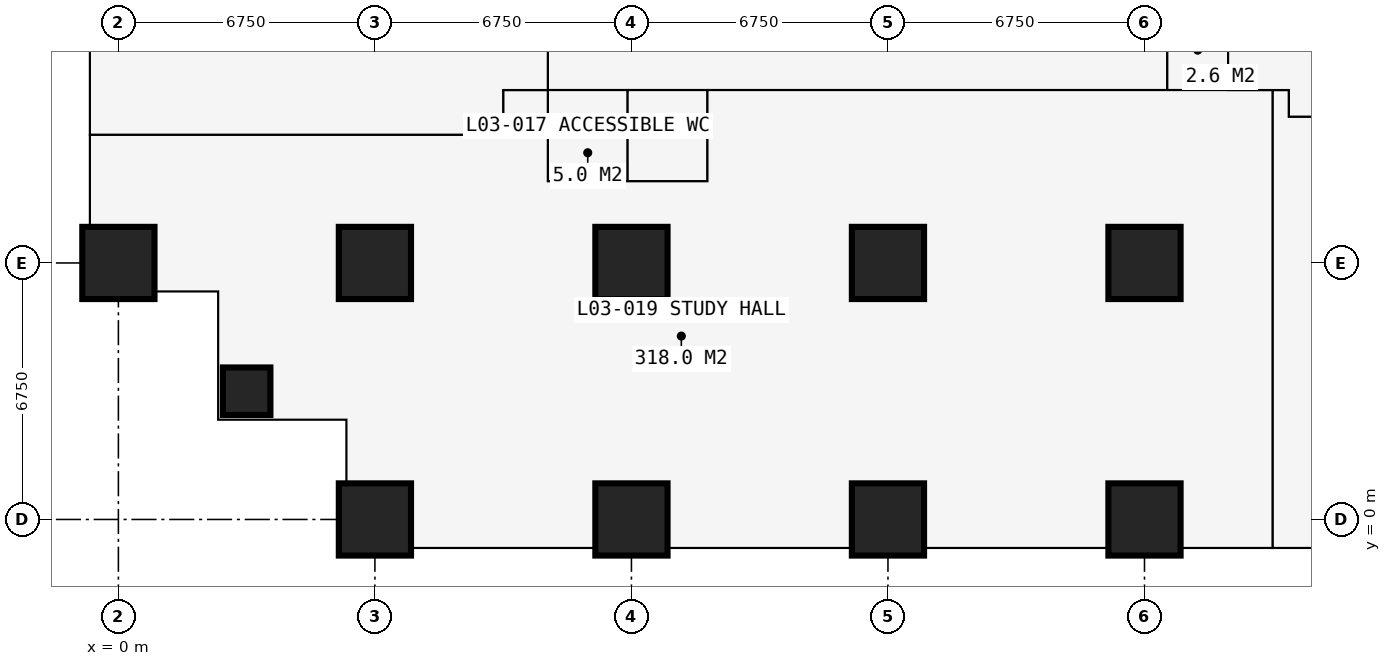
"""IFC4 building model, lengths in metres.
Left out: names, types, materials, properties, quantities, classifications, styles, units other than length and angle.
Written with IfcOpenShell. Run it as: python <this file> out.ifc"""

import sys

from ifc_helpers import new_model, si_unit, direction, frame, frame_2d, origin, origin_2d, place, context, subcontext, project, spatial, rectangle, extrude, element, fill, save


model = new_model("IFC4")
c1 = context("Model", 3, precision=1e-05, world=origin(), true_north=direction((0.0, 1.0)))
c2 = subcontext(c1, "Body", "Model", "MODEL_VIEW")
j1 = project(units=[si_unit("LENGTHUNIT", "METRE"), si_unit("PLANEANGLEUNIT", "RADIAN")], contexts=[c1])
p1 = place(None, origin())
s1 = spatial("IfcSite", under=j1, at=p1, CompositionType="ELEMENT")
p2 = place(p1, origin())
s2 = spatial("IfcBuilding", under=s1, at=p2, CompositionType="ELEMENT")
p3 = place(p2, frame((0.0, 0.0, 13.5)))
s3 = spatial("IfcBuildingStorey", under=s2, at=p3, CompositionType="ELEMENT", Elevation=13.5)
p4 = place(p3, frame((0.0, 6.75, 0.0), z_axis=(0.0, 0.0, 1.0), x_axis=(1.0, 0.0, 0.0)))
e1 = element("IfcColumn", 1, at=p4, inside=s3, PredefinedType="COLUMN", context=c2, shape_type="SweptSolid", body=[
    extrude(rectangle(XDim=1.9, YDim=1.9, at=origin_2d()), origin(), (0.0, 0.0, 1.0), 4.5),
])
p5 = place(p3, frame((3.375, 3.375, 0.0), z_axis=(0.0, 0.0, 1.0), x_axis=(1.0, 0.0, 0.0)))
e2 = element("IfcColumn", 2, at=p5, inside=s3, PredefinedType="COLUMN", context=c2, shape_type="SweptSolid", body=[
    extrude(rectangle(XDim=1.25, YDim=1.25, at=origin_2d()), origin(), (0.0, 0.0, 1.0), 4.5),
])
for number, where, z_axis, x_axis in (
    (3, (6.75, 0.0, 0.0), (0.0, 0.0, 1.0), (1.0, 0.0, 0.0)),
    (4, (6.75, 6.75, 0.0), (0.0, 0.0, 1.0), (1.0, 0.0, 0.0)),
    (5, (13.5, 0.0, 0.0), (0.0, 0.0, 1.0), (1.0, 0.0, 0.0)),
    (6, (13.5, 6.75, 0.0), (0.0, 0.0, 1.0), (1.0, 0.0, 0.0)),
    (7, (20.25, 0.0, 0.0), (0.0, 0.0, 1.0), (1.0, 0.0, 0.0)),
    (8, (20.25, 6.75, 0.0), (0.0, 0.0, 1.0), (1.0, 0.0, 0.0)),
    (9, (27.0, 0.0, 0.0), (0.0, 0.0, 1.0), (1.0, 0.0, 0.0)),
    (10, (27.0, 6.75, 0.0), (0.0, 0.0, 1.0), (1.0, 0.0, 0.0)),
):
    element("IfcColumn", number, at=place(p3, frame(where, z_axis=z_axis, x_axis=x_axis)), inside=s3, PredefinedType="COLUMN", context=c2, shape_type="SweptSolid", body=[
        extrude(rectangle(XDim=1.9, YDim=1.9, at=origin_2d()), origin(), (0.0, 0.0, 1.0), 4.5),
    ])
p6 = place(p3, frame((-0.75, 6.0, 0.0), z_axis=(0.0, 0.0, 1.0), x_axis=(1.0, 0.0, 0.0)))
e11 = element("IfcWall", 11, at=p6, inside=s3, PredefinedType="SOLIDWALL", context=c2, shape_type="SweptSolid", body=[
    extrude(rectangle(XDim=3.375, YDim=0.3, at=frame_2d((1.688, 0.0))), origin(), (0.0, 0.0, 1.0), 4.275),
])
p7 = place(p6, frame((1.857, 0.0, 0.9)))
e12 = element("IfcOpeningElement", 12, at=p7, cuts=e11, PredefinedType="OPENING", context=c2, shape_type="SweptSolid", body=[
    extrude(rectangle(XDim=1.2, YDim=1.8, at=frame_2d((0.6, 0.9))), frame((0.0, 0.16, 0.0), z_axis=(0.0, -1.0, 0.0), x_axis=(1.0, 0.0, 0.0)), (0.0, 0.0, 1.0), 0.32),
])
p8 = place(p3, frame((2.625, 6.0, 0.0), z_axis=(0.0, 0.0, 1.0), x_axis=(0.0, -1.0, 0.0)))
e13 = element("IfcWall", 13, at=p8, inside=s3, PredefinedType="SOLIDWALL", context=c2, shape_type="SweptSolid", body=[
    extrude(rectangle(XDim=3.375, YDim=0.3, at=frame_2d((1.688, 0.0))), origin(), (0.0, 0.0, 1.0), 4.275),
])
p9 = place(p8, frame((0.938, 0.0, 0.9)))
e14 = element("IfcOpeningElement", 14, at=p9, cuts=e13, PredefinedType="OPENING", context=c2, shape_type="SweptSolid", body=[
    extrude(rectangle(XDim=1.5, YDim=1.8, at=frame_2d((0.75, 0.9))), frame((0.0, 0.16, 0.0), z_axis=(0.0, -1.0, 0.0), x_axis=(1.0, 0.0, 0.0)), (0.0, 0.0, 1.0), 0.32),
])
p10 = place(p3, frame((2.625, 2.625, 0.0), z_axis=(0.0, 0.0, 1.0), x_axis=(1.0, 0.0, 0.0)))
e15 = element("IfcWall", 15, at=p10, inside=s3, PredefinedType="SOLIDWALL", context=c2, shape_type="SweptSolid", body=[
    extrude(rectangle(XDim=3.375, YDim=0.3, at=frame_2d((1.688, 0.0))), origin(), (0.0, 0.0, 1.0), 4.275),
])
p11 = place(p10, frame((0.938, 0.0, 0.9)))
e16 = element("IfcOpeningElement", 16, at=p11, cuts=e15, PredefinedType="OPENING", context=c2, shape_type="SweptSolid", body=[
    extrude(rectangle(XDim=1.5, YDim=1.8, at=frame_2d((0.75, 0.9))), frame((0.0, 0.16, 0.0), z_axis=(0.0, -1.0, 0.0), x_axis=(1.0, 0.0, 0.0)), (0.0, 0.0, 1.0), 0.32),
])
p12 = place(p3, frame((6.0, 2.625, 0.0), z_axis=(0.0, 0.0, 1.0), x_axis=(0.0, -1.0, 0.0)))
e17 = element("IfcWall", 17, at=p12, inside=s3, PredefinedType="SOLIDWALL", context=c2, shape_type="SweptSolid", body=[
    extrude(rectangle(XDim=3.375, YDim=0.3, at=frame_2d((1.688, 0.0))), origin(), (0.0, 0.0, 1.0), 4.275),
])
p13 = place(p12, frame((0.317, 0.0, 0.9)))
e18 = element("IfcOpeningElement", 18, at=p13, cuts=e17, PredefinedType="OPENING", context=c2, shape_type="SweptSolid", body=[
    extrude(rectangle(XDim=1.2, YDim=1.8, at=frame_2d((0.6, 0.9))), frame((0.0, 0.16, 0.0), z_axis=(0.0, -1.0, 0.0), x_axis=(1.0, 0.0, 0.0)), (0.0, 0.0, 1.0), 0.32),
])
p14 = place(p3, frame((27.0, -0.75, 0.0), z_axis=(0.0, 0.0, 1.0), x_axis=(-1.0, 0.0, 0.0)))
e19 = element("IfcWall", 19, at=p14, inside=s3, PredefinedType="SOLIDWALL", context=c2, shape_type="SweptSolid", body=[
    extrude(rectangle(XDim=6.75, YDim=0.15, at=frame_2d((3.375, 0.0))), origin(), (0.0, 0.0, 1.0), 4.275),
])
p15 = place(p14, frame((0.962, 0.0, 0.0)))
e20 = element("IfcOpeningElement", 20, at=p15, cuts=e19, PredefinedType="OPENING", context=c2, shape_type="SweptSolid", body=[
    extrude(rectangle(XDim=2.4, YDim=2.4, at=frame_2d((1.2, 1.2))), frame((0.0, 0.085, 0.0), z_axis=(0.0, -1.0, 0.0), x_axis=(1.0, 0.0, 0.0)), (0.0, 0.0, 1.0), 0.17),
])
p16 = place(p14, frame((3.387, 0.0, 0.0)))
e21 = element("IfcOpeningElement", 21, at=p16, cuts=e19, PredefinedType="OPENING", context=c2, shape_type="SweptSolid", body=[
    extrude(rectangle(XDim=2.4, YDim=2.4, at=frame_2d((1.2, 1.2))), frame((0.0, 0.085, 0.0), z_axis=(0.0, -1.0, 0.0), x_axis=(1.0, 0.0, 0.0)), (0.0, 0.0, 1.0), 0.17),
])
p17 = place(p3, frame((-0.734, 10.125, 0.0), z_axis=(0.0, 0.0, 1.0), x_axis=(1.0, 0.0, 0.0)))
e22 = element("IfcWall", 22, at=p17, inside=s3, PredefinedType="PARTITIONING", context=c2, shape_type="SweptSolid", body=[
    extrude(rectangle(XDim=10.859, YDim=0.15, at=frame_2d((5.429, 0.0))), origin(), (0.0, 0.0, 1.0), 4.275),
])
p18 = place(p3, frame((10.125, 10.125, 0.0), z_axis=(0.0, 0.0, 1.0), x_axis=(0.0, 1.0, 0.0)))
e23 = element("IfcWall", 23, at=p18, inside=s3, PredefinedType="PARTITIONING", context=c2, shape_type="SweptSolid", body=[
    extrude(rectangle(XDim=1.175, YDim=0.15, at=frame_2d((0.587, 0.0))), origin(), (0.0, 0.0, 1.0), 4.275),
])
p19 = place(p3, frame((10.125, 11.3, 0.0), z_axis=(0.0, 0.0, 1.0), x_axis=(1.0, 0.0, 0.0)))
e24 = element("IfcWall", 24, at=p19, inside=s3, PredefinedType="PARTITIONING", context=c2, shape_type="SweptSolid", body=[
    extrude(rectangle(XDim=20.675, YDim=0.15, at=frame_2d((10.337, 0.0))), origin(), (0.0, 0.0, 1.0), 4.275),
])
p20 = place(p19, frame((1.725, 0.0, 0.0)))
e25 = element("IfcOpeningElement", 25, at=p20, cuts=e24, PredefinedType="OPENING", context=c2, shape_type="SweptSolid", body=[
    extrude(rectangle(XDim=1.0, YDim=2.2, at=frame_2d((0.5, 1.1))), frame((0.0, 0.085, 0.0), z_axis=(0.0, -1.0, 0.0), x_axis=(1.0, 0.0, 0.0)), (0.0, 0.0, 1.0), 0.17),
])
p21 = place(p19, frame((3.825, 0.0, 0.0)))
e26 = element("IfcOpeningElement", 26, at=p21, cuts=e24, PredefinedType="OPENING", context=c2, shape_type="SweptSolid", body=[
    extrude(rectangle(XDim=1.0, YDim=2.2, at=frame_2d((0.5, 1.1))), frame((0.0, 0.085, 0.0), z_axis=(0.0, -1.0, 0.0), x_axis=(1.0, 0.0, 0.0)), (0.0, 0.0, 1.0), 0.17),
])
p22 = place(p19, frame((10.625, 0.0, 0.0)))
e27 = element("IfcOpeningElement", 27, at=p22, cuts=e24, PredefinedType="OPENING", context=c2, shape_type="SweptSolid", body=[
    extrude(rectangle(XDim=1.6, YDim=2.4, at=frame_2d((0.8, 1.2))), frame((0.0, 0.085, 0.0), z_axis=(0.0, -1.0, 0.0), x_axis=(1.0, 0.0, 0.0)), (0.0, 0.0, 1.0), 0.17),
])
p23 = place(p3, frame((11.3, 8.9, 0.0), z_axis=(0.0, 0.0, 1.0), x_axis=(0.0, 1.0, 0.0)))
e28 = element("IfcWall", 28, at=p23, inside=s3, PredefinedType="PARTITIONING", context=c2, shape_type="SweptSolid", body=[
    extrude(rectangle(XDim=21.475, YDim=0.15, at=frame_2d((10.738, 0.0))), origin(), (0.0, 0.0, 1.0), 4.275),
])
p24 = place(p23, frame((16.65, 0.0, 0.0)))
e29 = element("IfcOpeningElement", 29, at=p24, cuts=e28, PredefinedType="OPENING", context=c2, shape_type="SweptSolid", body=[
    extrude(rectangle(XDim=1.0, YDim=2.2, at=frame_2d((0.5, 1.1))), frame((0.0, 0.085, 0.0), z_axis=(0.0, -1.0, 0.0), x_axis=(1.0, 0.0, 0.0)), (0.0, 0.0, 1.0), 0.17),
])
p25 = place(p23, frame((18.75, 0.0, 0.0)))
e30 = element("IfcOpeningElement", 30, at=p25, cuts=e28, PredefinedType="OPENING", context=c2, shape_type="SweptSolid", body=[
    extrude(rectangle(XDim=1.0, YDim=2.2, at=frame_2d((0.5, 1.1))), frame((0.0, 0.085, 0.0), z_axis=(0.0, -1.0, 0.0), x_axis=(1.0, 0.0, 0.0)), (0.0, 0.0, 1.0), 0.17),
])
p26 = place(p23, frame((8.45, 0.0, 0.0)))
e31 = element("IfcOpeningElement", 31, at=p26, cuts=e28, PredefinedType="OPENING", context=c2, shape_type="SweptSolid", body=[
    extrude(rectangle(XDim=1.6, YDim=2.4, at=frame_2d((0.8, 1.2))), frame((0.0, 0.085, 0.0), z_axis=(0.0, -1.0, 0.0), x_axis=(1.0, 0.0, 0.0)), (0.0, 0.0, 1.0), 0.17),
])
p27 = place(p3, frame((11.3, 8.9, 0.0), z_axis=(0.0, 0.0, 1.0), x_axis=(1.0, 0.0, 0.0)))
e32 = element("IfcWall", 32, at=p27, inside=s3, PredefinedType="PARTITIONING", context=c2, shape_type="SweptSolid", body=[
    extrude(rectangle(XDim=4.2, YDim=0.15, at=frame_2d((2.1, 0.0))), origin(), (0.0, 0.0, 1.0), 4.275),
])
p28 = place(p3, frame((13.4, 8.9, 0.0), z_axis=(0.0, 0.0, 1.0), x_axis=(0.0, 1.0, 0.0)))
e33 = element("IfcWall", 33, at=p28, inside=s3, PredefinedType="PARTITIONING", context=c2, shape_type="SweptSolid", body=[
    extrude(rectangle(XDim=2.4, YDim=0.1, at=frame_2d((1.2, 0.0))), origin(), (0.0, 0.0, 1.0), 3.777),
])
p29 = place(p3, frame((15.5, 8.9, 0.0), z_axis=(0.0, 0.0, 1.0), x_axis=(0.0, 1.0, 0.0)))
e34 = element("IfcWall", 34, at=p29, inside=s3, PredefinedType="PARTITIONING", context=c2, shape_type="SweptSolid", body=[
    extrude(rectangle(XDim=2.4, YDim=0.1, at=frame_2d((1.2, 0.0))), origin(), (0.0, 0.0, 1.0), 4.275),
])
p30 = place(p3, frame((27.6, 11.3, 0.0), z_axis=(0.0, 0.0, 1.0), x_axis=(0.0, 1.0, 0.0)))
e35 = element("IfcWall", 35, at=p30, inside=s3, PredefinedType="PARTITIONING", context=c2, shape_type="SweptSolid", body=[
    extrude(rectangle(XDim=1.6, YDim=0.15, at=frame_2d((0.8, 0.0))), origin(), (0.0, 0.0, 1.0), 4.275),
])
p31 = place(p30, frame((0.3, 0.0, 0.0)))
e36 = element("IfcOpeningElement", 36, at=p31, cuts=e35, PredefinedType="OPENING", context=c2, shape_type="SweptSolid", body=[
    extrude(rectangle(XDim=0.95, YDim=2.2, at=frame_2d((0.475, 1.1))), frame((0.0, 0.085, 0.0), z_axis=(0.0, -1.0, 0.0), x_axis=(1.0, 0.0, 0.0)), (0.0, 0.0, 1.0), 0.17),
])
p32 = place(p3, frame((29.2, 11.3, 0.0), z_axis=(0.0, 0.0, 1.0), x_axis=(0.0, 1.0, 0.0)))
e37 = element("IfcWall", 37, at=p32, inside=s3, PredefinedType="PARTITIONING", context=c2, shape_type="SweptSolid", body=[
    extrude(rectangle(XDim=20.3, YDim=0.15, at=frame_2d((10.15, 0.0))), origin(), (0.0, 0.0, 1.0), 4.275),
])
p33 = place(p32, frame((15.35, 0.0, 0.0)))
e38 = element("IfcOpeningElement", 38, at=p33, cuts=e37, PredefinedType="OPENING", context=c2, shape_type="SweptSolid", body=[
    extrude(rectangle(XDim=1.6, YDim=2.4, at=frame_2d((0.8, 1.2))), frame((0.0, 0.085, 0.0), z_axis=(0.0, -1.0, 0.0), x_axis=(1.0, 0.0, 0.0)), (0.0, 0.0, 1.0), 0.17),
])
p34 = place(p32, frame((8.35, 0.0, 0.0)))
e39 = element("IfcOpeningElement", 39, at=p34, cuts=e37, PredefinedType="OPENING", context=c2, shape_type="SweptSolid", body=[
    extrude(rectangle(XDim=1.2, YDim=2.2, at=frame_2d((0.6, 1.1))), frame((0.0, 0.085, 0.0), z_axis=(0.0, -1.0, 0.0), x_axis=(1.0, 0.0, 0.0)), (0.0, 0.0, 1.0), 0.17),
])
p35 = place(p3, frame((30.375, -0.734, 0.0), z_axis=(0.0, 0.0, 1.0), x_axis=(0.0, 1.0, 0.0)))
e40 = element("IfcWall", 40, at=p35, inside=s3, PredefinedType="PARTITIONING", context=c2, shape_type="SweptSolid", body=[
    extrude(rectangle(XDim=12.034, YDim=0.15, at=frame_2d((6.017, 0.0))), origin(), (0.0, 0.0, 1.0), 4.275),
])
p36 = place(p3, frame((30.8, 10.6, 0.0), z_axis=(0.0, 0.0, 1.0), x_axis=(0.0, 1.0, 0.0)))
e41 = element("IfcWall", 41, at=p36, inside=s3, PredefinedType="PARTITIONING", context=c2, shape_type="SweptSolid", body=[
    extrude(rectangle(XDim=0.7, YDim=0.15, at=frame_2d((0.35, 0.0))), origin(), (0.0, 0.0, 1.0), 4.275),
])
p37 = place(p3, frame((30.8, 10.6, 0.0), z_axis=(0.0, 0.0, 1.0), x_axis=(1.0, 0.0, 0.0)))
e42 = element("IfcWall", 42, at=p37, inside=s3, PredefinedType="PARTITIONING", context=c2, shape_type="SweptSolid", body=[
    extrude(rectangle(XDim=1.85, YDim=0.15, at=frame_2d((0.925, 0.0))), origin(), (0.0, 0.0, 1.0), 4.275),
])
p38 = place(p7, origin())
e43 = element("IfcWindow", 43, at=p38, inside=s3, PartitioningType="SINGLE_PANEL", PredefinedType="WINDOW", context=c2, shape_type="SweptSolid", body=[
    extrude(rectangle(XDim=1.2, YDim=1.8, at=frame_2d((0.6, 0.9))), frame((0.0, 0.03, 0.0), z_axis=(0.0, -1.0, 0.0), x_axis=(1.0, 0.0, 0.0)), (0.0, 0.0, 1.0), 0.06),
])
fill(e12, e43)
p39 = place(p9, origin())
e44 = element("IfcWindow", 44, at=p39, inside=s3, PartitioningType="SINGLE_PANEL", PredefinedType="WINDOW", context=c2, shape_type="SweptSolid", body=[
    extrude(rectangle(XDim=1.5, YDim=1.8, at=frame_2d((0.75, 0.9))), frame((0.0, 0.03, 0.0), z_axis=(0.0, -1.0, 0.0), x_axis=(1.0, 0.0, 0.0)), (0.0, 0.0, 1.0), 0.06),
])
fill(e14, e44)
p40 = place(p11, origin())
e45 = element("IfcWindow", 45, at=p40, inside=s3, PartitioningType="SINGLE_PANEL", PredefinedType="WINDOW", context=c2, shape_type="SweptSolid", body=[
    extrude(rectangle(XDim=1.5, YDim=1.8, at=frame_2d((0.75, 0.9))), frame((0.0, 0.03, 0.0), z_axis=(0.0, -1.0, 0.0), x_axis=(1.0, 0.0, 0.0)), (0.0, 0.0, 1.0), 0.06),
])
fill(e16, e45)
p41 = place(p13, origin())
e46 = element("IfcWindow", 46, at=p41, inside=s3, PartitioningType="SINGLE_PANEL", PredefinedType="WINDOW", context=c2, shape_type="SweptSolid", body=[
    extrude(rectangle(XDim=1.2, YDim=1.8, at=frame_2d((0.6, 0.9))), frame((0.0, 0.03, 0.0), z_axis=(0.0, -1.0, 0.0), x_axis=(1.0, 0.0, 0.0)), (0.0, 0.0, 1.0), 0.06),
])
fill(e18, e46)
p42 = place(p15, origin())
e47 = element("IfcDoor", 47, at=p42, inside=s3, OperationType="SLIDING_TO_LEFT", PredefinedType="DOOR", context=c2, shape_type="SweptSolid", body=[
    extrude(rectangle(XDim=2.4, YDim=2.4, at=frame_2d((1.2, 1.2))), frame((0.0, 0.025, 0.0), z_axis=(0.0, -1.0, 0.0), x_axis=(1.0, 0.0, 0.0)), (0.0, 0.0, 1.0), 0.05),
])
fill(e20, e47)
p43 = place(p16, origin())
e48 = element("IfcDoor", 48, at=p43, inside=s3, OperationType="SLIDING_TO_LEFT", PredefinedType="DOOR", context=c2, shape_type="SweptSolid", body=[
    extrude(rectangle(XDim=2.4, YDim=2.4, at=frame_2d((1.2, 1.2))), frame((0.0, 0.025, 0.0), z_axis=(0.0, -1.0, 0.0), x_axis=(1.0, 0.0, 0.0)), (0.0, 0.0, 1.0), 0.05),
])
fill(e21, e48)
p44 = place(p31, origin())
e49 = element("IfcDoor", 49, at=p44, inside=s3, OperationType="SINGLE_SWING_LEFT", PredefinedType="DOOR", context=c2, shape_type="SweptSolid", body=[
    extrude(rectangle(XDim=0.95, YDim=2.2, at=frame_2d((0.475, 1.1))), frame((0.0, 0.025, 0.0), z_axis=(0.0, -1.0, 0.0), x_axis=(1.0, 0.0, 0.0)), (0.0, 0.0, 1.0), 0.05),
])
fill(e36, e49)
p45 = place(p20, origin())
e50 = element("IfcDoor", 50, at=p45, inside=s3, OperationType="SINGLE_SWING_LEFT", PredefinedType="DOOR", context=c2, shape_type="SweptSolid", body=[
    extrude(rectangle(XDim=1.0, YDim=2.2, at=frame_2d((0.5, 1.1))), frame((0.0, 0.025, 0.0), z_axis=(0.0, -1.0, 0.0), x_axis=(1.0, 0.0, 0.0)), (0.0, 0.0, 1.0), 0.05),
])
fill(e25, e50)
p46 = place(p21, origin())
e51 = element("IfcDoor", 51, at=p46, inside=s3, OperationType="SINGLE_SWING_LEFT", PredefinedType="DOOR", context=c2, shape_type="SweptSolid", body=[
    extrude(rectangle(XDim=1.0, YDim=2.2, at=frame_2d((0.5, 1.1))), frame((0.0, 0.025, 0.0), z_axis=(0.0, -1.0, 0.0), x_axis=(1.0, 0.0, 0.0)), (0.0, 0.0, 1.0), 0.05),
])
fill(e26, e51)
p47 = place(p22, origin())
e52 = element("IfcDoor", 52, at=p47, inside=s3, OperationType="DOUBLE_DOOR_SINGLE_SWING", PredefinedType="DOOR", context=c2, shape_type="SweptSolid", body=[
    extrude(rectangle(XDim=1.6, YDim=2.4, at=frame_2d((0.8, 1.2))), frame((0.0, 0.025, 0.0), z_axis=(0.0, -1.0, 0.0), x_axis=(1.0, 0.0, 0.0)), (0.0, 0.0, 1.0), 0.05),
])
fill(e27, e52)
save(model, sys.argv[1])
